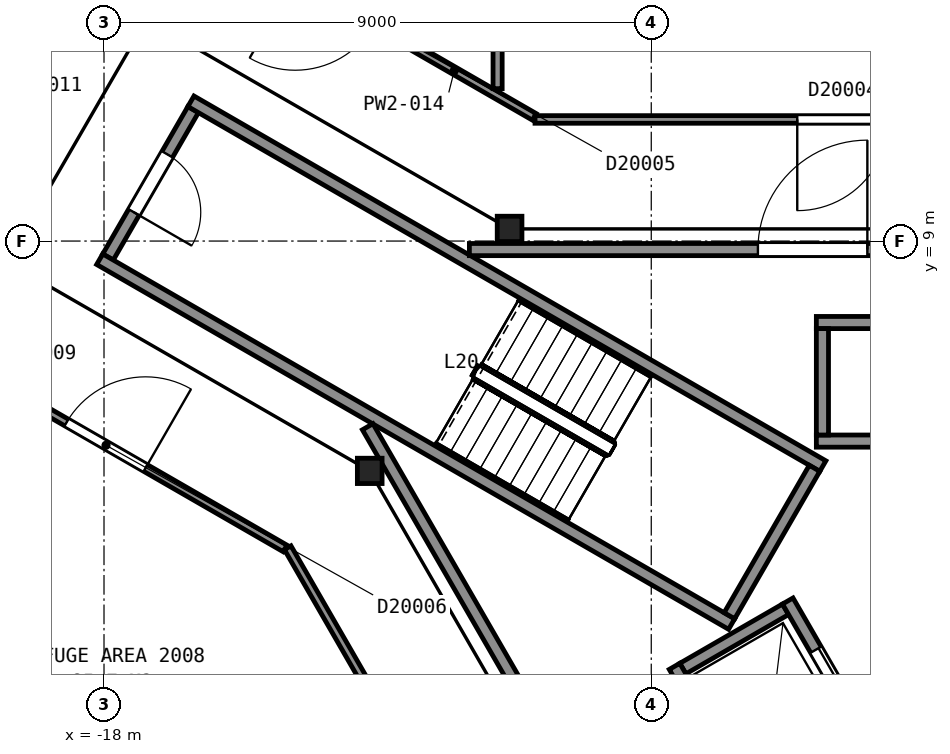
"""IFC4 building model, lengths in metres.
Left out: names, types, materials, properties, quantities, classifications, styles, units other than length and angle.
Written with IfcOpenShell. Run it as: python <this file> out.ifc"""

import sys

from ifc_helpers import new_model, si_unit, direction, frame, frame_2d, origin, origin_2d, place, context, subcontext, project, spatial, rectangle, i_section, extrude, element, fill, save


model = new_model("IFC4")
c1 = context("Model", 3, precision=1e-05, world=origin(), true_north=direction((0.0, 1.0)))
c2 = subcontext(c1, "Body", "Model", "MODEL_VIEW")
j1 = project(units=[si_unit("LENGTHUNIT", "METRE"), si_unit("PLANEANGLEUNIT", "RADIAN")], contexts=[c1])
p1 = place(None, origin())
s1 = spatial("IfcSite", under=j1, at=p1, CompositionType="ELEMENT")
p2 = place(p1, origin())
s2 = spatial("IfcBuilding", under=s1, at=p2, CompositionType="ELEMENT")
p3 = place(p2, frame((0.0, 0.0, 87.2)))
s3 = spatial("IfcBuildingStorey", under=s2, at=p3, CompositionType="ELEMENT", Elevation=87.2)
for number, where, z_axis, x_axis in (
    (1, (-11.33, 9.2, 0.0), (0.0, 0.0, 1.0), (1.0, 0.0, 0.0)),
    (2, (-13.63, 5.22, 0.0), (0.0, 0.0, 1.0), (1.0, 0.0, 0.0)),
):
    element("IfcColumn", number, at=place(p3, frame(where, z_axis=z_axis, x_axis=x_axis)), inside=s3, PredefinedType="COLUMN", context=c2, shape_type="SweptSolid", body=[
        extrude(i_section(OverallWidth=0.406, OverallDepth=0.417, WebThickness=0.03, FlangeThickness=0.048, FilletRadius=0.015, at=origin_2d()), origin(), (0.0, 0.0, 1.0), 5.6),
    ])
p4 = place(p3, frame((-16.534, 11.162, 0.0), z_axis=(0.0, 0.0, 1.0), x_axis=(-0.49998411664, -0.866034573852, 0.0)))
e3 = element("IfcWall", 3, at=p4, inside=s3, PredefinedType="PARTITIONING", context=c2, shape_type="SweptSolid", body=[
    extrude(rectangle(XDim=2.8, YDim=0.2, at=frame_2d((1.4, 0.0))), origin(), (0.0, 0.0, 1.0), 5.35),
])
p5 = place(p4, frame((0.85, 0.0, 0.0)))
e4 = element("IfcOpeningElement", 4, at=p5, cuts=e3, PredefinedType="OPENING", context=c2, shape_type="SweptSolid", body=[
    extrude(rectangle(XDim=1.1, YDim=2.1, at=frame_2d((0.55, 1.05))), frame((0.0, 0.11, 0.0), z_axis=(0.0, -1.0, 0.0), x_axis=(1.0, 0.0, 0.0)), (0.0, 0.0, 1.0), 0.22),
])
for number, where, z_axis, x_axis in (
    (5, (-7.678, 2.701, 0.0), (0.0, 0.0, 1.0), (-0.866, 0.5, 0.0)),
    (6, (-6.178, 5.299, 0.0), (0.0, 0.0, 1.0), (-0.866, 0.5, 0.0)),
):
    element("IfcWall", number, at=place(p3, frame(where, z_axis=z_axis, x_axis=x_axis)), inside=s3, PredefinedType="PARTITIONING", context=c2, shape_type="SweptSolid", body=[
        extrude(rectangle(XDim=12.0, YDim=0.2, at=frame_2d((6.0, 0.0))), origin(), (0.0, 0.0, 1.0), 5.35),
    ])
p6 = place(p3, frame((-6.315, 5.262, 0.0), z_axis=(0.0, 0.0, 1.0), x_axis=(-0.500049511043, -0.865996816683, 0.0)))
e7 = element("IfcWall", 7, at=p6, inside=s3, PredefinedType="PARTITIONING", context=c2, shape_type="SweptSolid", body=[
    extrude(rectangle(XDim=2.8, YDim=0.2, at=frame_2d((1.4, 0.0))), origin(), (0.0, 0.0, 1.0), 5.35),
])
for number, where, z_axis, x_axis in (
    (8, (-6.285, 5.71, 0.0), (0.0, 0.0, 1.0), (1.0, 0.0, 0.0)),
    (9, (-6.285, 7.66, 0.0), (0.0, 0.0, 1.0), (1.0, 0.0, 0.0)),
):
    element("IfcWall", number, at=place(p3, frame(where, z_axis=z_axis, x_axis=x_axis)), inside=s3, PredefinedType="PARTITIONING", context=c2, shape_type="SweptSolid", body=[
        extrude(rectangle(XDim=2.35, YDim=0.2, at=frame_2d((1.175, 0.0))), origin(), (0.0, 0.0, 1.0), 5.6),
    ])
p7 = place(p3, frame((-8.48, 1.969, 0.0), z_axis=(0.0, 0.0, 1.0), x_axis=(0.866000020948, 0.500043961785, 0.0)))
e10 = element("IfcWall", 10, at=p7, inside=s3, PredefinedType="PARTITIONING", context=c2, shape_type="SweptSolid", body=[
    extrude(rectangle(XDim=1.95, YDim=0.2, at=frame_2d((0.975, 0.0))), origin(), (0.0, 0.0, 1.0), 5.6),
])
p8 = place(p3, frame((-6.185, 5.81, 0.0), z_axis=(0.0, 0.0, 1.0), x_axis=(0.0, 1.0, 0.0)))
e11 = element("IfcWall", 11, at=p8, inside=s3, PredefinedType="PARTITIONING", context=c2, shape_type="SweptSolid", body=[
    extrude(rectangle(XDim=1.75, YDim=0.2, at=frame_2d((0.875, 0.0))), origin(), (0.0, 0.0, 1.0), 5.6),
])
p9 = place(p3, frame((-5.28, 0.525, 0.0), z_axis=(0.0, 0.0, 1.0), x_axis=(-0.500037662692, 0.866003658127, 0.0)))
e12 = element("IfcWall", 12, at=p9, inside=s3, PredefinedType="PARTITIONING", context=c2, shape_type="SweptSolid", body=[
    extrude(rectangle(XDim=2.95, YDim=0.2, at=frame_2d((1.475, 0.0))), origin(), (0.0, 0.0, 1.0), 5.6),
])
p10 = place(p9, frame((0.925, 0.0, 0.0)))
e13 = element("IfcOpeningElement", 13, at=p10, cuts=e12, PredefinedType="OPENING", context=c2, shape_type="SweptSolid", body=[
    extrude(rectangle(XDim=1.1, YDim=2.1, at=frame_2d((0.55, 1.05))), frame((0.0, 0.11, 0.0), z_axis=(0.0, -1.0, 0.0), x_axis=(1.0, 0.0, 0.0)), (0.0, 0.0, 1.0), 0.22),
])
p11 = place(p3, frame((-7.242, -0.376, 0.0), z_axis=(0.0, 0.0, 1.0), x_axis=(-0.499996545922, 0.866027397988, 0.0)))
e14 = element("IfcWall", 14, at=p11, inside=s3, PredefinedType="PARTITIONING", context=c2, shape_type="SweptSolid", body=[
    extrude(rectangle(XDim=2.75, YDim=0.2, at=frame_2d((1.375, 0.0))), origin(), (0.0, 0.0, 1.0), 5.6),
])
p12 = place(p3, frame((-13.664, 5.946, 0.0), z_axis=(0.0, 0.0, 1.0), x_axis=(0.499994327219, -0.866028678941, 0.0)))
e15 = element("IfcWall", 15, at=p12, inside=s3, PredefinedType="PARTITIONING", context=c2, shape_type="SweptSolid", body=[
    extrude(rectangle(XDim=23.968, YDim=0.2, at=frame_2d((11.984, 0.0))), origin(), (0.0, 0.0, 1.0), 5.35),
])
p13 = place(p3, frame((0.263, 8.86, 0.0), z_axis=(0.0, 0.0, 1.0), x_axis=(-1.0, 0.0, 0.0)))
e16 = element("IfcWall", 16, at=p13, inside=s3, PredefinedType="PARTITIONING", context=c2, shape_type="SweptSolid", body=[
    extrude(rectangle(XDim=12.254, YDim=0.2, at=frame_2d((6.127, 0.0))), origin(), (0.0, 0.0, 1.0), 5.35),
])
p14 = place(p13, frame((5.709, 0.0, 0.0)))
e17 = element("IfcOpeningElement", 17, at=p14, cuts=e16, PredefinedType="OPENING", context=c2, shape_type="SweptSolid", body=[
    extrude(rectangle(XDim=1.8, YDim=2.1, at=frame_2d((0.9, 1.05))), frame((0.0, 0.11, 0.0), z_axis=(0.0, -1.0, 0.0), x_axis=(1.0, 0.0, 0.0)), (0.0, 0.0, 1.0), 0.22),
])
p15 = place(p3, frame((-15.022, 3.944, 0.0), z_axis=(0.0, 0.0, 1.0), x_axis=(-0.866435403895, 0.49928918562, 0.0)))
e18 = element("IfcWall", 18, at=p15, inside=s3, PredefinedType="PARTITIONING", context=c2, shape_type="SweptSolid", body=[
    extrude(rectangle(XDim=6.912, YDim=0.125, at=frame_2d((3.456, 0.0))), origin(), (0.0, 0.0, 1.0), 4.262),
])
p16 = place(p15, frame((2.649, 0.0, 0.0)))
e19 = element("IfcOpeningElement", 19, at=p16, cuts=e18, PredefinedType="OPENING", context=c2, shape_type="SweptSolid", body=[
    extrude(rectangle(XDim=1.5, YDim=2.1, at=frame_2d((0.75, 1.05))), frame((0.0, 0.073, 0.0), z_axis=(0.0, -1.0, 0.0), x_axis=(1.0, 0.0, 0.0)), (0.0, 0.0, 1.0), 0.145),
])
p17 = place(p3, frame((-16.903, 14.489, 0.0), z_axis=(0.0, 0.0, 1.0), x_axis=(0.866404548649, -0.499342726071, 0.0)))
e20 = element("IfcWall", 20, at=p17, inside=s3, PredefinedType="PARTITIONING", context=c2, shape_type="SweptSolid", body=[
    extrude(rectangle(XDim=6.903, YDim=0.125, at=frame_2d((3.451, 0.0))), origin(), (0.0, 0.0, 1.0), 4.262),
])
p18 = place(p17, frame((2.363, 0.0, 0.0)))
e21 = element("IfcOpeningElement", 21, at=p18, cuts=e20, PredefinedType="OPENING", context=c2, shape_type="SweptSolid", body=[
    extrude(rectangle(XDim=1.5, YDim=2.1, at=frame_2d((0.75, 1.05))), frame((0.0, 0.073, 0.0), z_axis=(0.0, -1.0, 0.0), x_axis=(1.0, 0.0, 0.0)), (0.0, 0.0, 1.0), 0.145),
])
p19 = place(p3, frame((-14.979, 3.956, 0.0), z_axis=(0.0, 0.0, 1.0), x_axis=(0.499335058772, -0.866408967568, 0.0)))
e22 = element("IfcWall", 22, at=p19, inside=s3, PredefinedType="PARTITIONING", context=c2, shape_type="SweptSolid", body=[
    extrude(rectangle(XDim=10.913, YDim=0.125, at=frame_2d((5.457, 0.0))), origin(), (0.0, 0.0, 1.0), 4.262),
])
p20 = place(p3, frame((-11.527, 11.506, 0.0), z_axis=(0.0, 0.0, 1.0), x_axis=(0.0, 1.0, 0.0)))
e23 = element("IfcWall", 23, at=p20, inside=s3, PredefinedType="PARTITIONING", context=c2, shape_type="SweptSolid", body=[
    extrude(rectangle(XDim=6.149, YDim=0.15, at=frame_2d((3.074, 0.0))), origin(), (0.0, 0.0, 1.0), 4.262),
])
p21 = place(p3, frame((-10.912, 11.0, 0.0), z_axis=(0.0, 0.0, 1.0), x_axis=(1.0, 0.0, 0.0)))
e24 = element("IfcWall", 24, at=p21, inside=s3, PredefinedType="PARTITIONING", context=c2, shape_type="SweptSolid", body=[
    extrude(rectangle(XDim=21.823, YDim=0.125, at=frame_2d((10.912, 0.0))), origin(), (0.0, 0.0, 1.0), 4.262),
])
p22 = place(p21, frame((17.946, 0.0, 0.0)))
e25 = element("IfcOpeningElement", 25, at=p22, cuts=e24, PredefinedType="OPENING", context=c2, shape_type="SweptSolid", body=[
    extrude(rectangle(XDim=1.2, YDim=2.1, at=frame_2d((0.6, 1.05))), frame((0.0, 0.073, 0.0), z_axis=(0.0, -1.0, 0.0), x_axis=(1.0, 0.0, 0.0)), (0.0, 0.0, 1.0), 0.145),
])
p23 = place(p21, frame((12.074, 0.0, 0.0)))
e26 = element("IfcOpeningElement", 26, at=p23, cuts=e24, PredefinedType="OPENING", context=c2, shape_type="SweptSolid", body=[
    extrude(rectangle(XDim=1.2, YDim=2.1, at=frame_2d((0.6, 1.05))), frame((0.0, 0.073, 0.0), z_axis=(0.0, -1.0, 0.0), x_axis=(1.0, 0.0, 0.0)), (0.0, 0.0, 1.0), 0.145),
])
p24 = place(p21, frame((4.312, 0.0, 0.0)))
e27 = element("IfcOpeningElement", 27, at=p24, cuts=e24, PredefinedType="OPENING", context=c2, shape_type="SweptSolid", body=[
    extrude(rectangle(XDim=1.5, YDim=2.1, at=frame_2d((0.75, 1.05))), frame((0.0, 0.073, 0.0), z_axis=(0.0, -1.0, 0.0), x_axis=(1.0, 0.0, 0.0)), (0.0, 0.0, 1.0), 0.145),
])
p25 = place(p5, origin())
e28 = element("IfcDoor", 28, at=p25, inside=s3, OperationType="SINGLE_SWING_RIGHT", PredefinedType="DOOR", context=c2, shape_type="SweptSolid", body=[
    extrude(rectangle(XDim=1.1, YDim=2.1, at=frame_2d((0.55, 1.05))), frame((0.0, 0.025, 0.0), z_axis=(0.0, -1.0, 0.0), x_axis=(1.0, 0.0, 0.0)), (0.0, 0.0, 1.0), 0.05),
])
fill(e4, e28)
p26 = place(p10, origin())
e29 = element("IfcDoor", 29, at=p26, inside=s3, OperationType="SLIDING_TO_LEFT", PredefinedType="DOOR", context=c2, shape_type="SweptSolid", body=[
    extrude(rectangle(XDim=1.1, YDim=2.1, at=frame_2d((0.55, 1.05))), frame((0.0, 0.025, 0.0), z_axis=(0.0, -1.0, 0.0), x_axis=(1.0, 0.0, 0.0)), (0.0, 0.0, 1.0), 0.05),
])
fill(e13, e29)
p27 = place(p14, origin())
e30 = element("IfcDoor", 30, at=p27, inside=s3, OperationType="DOUBLE_DOOR_SINGLE_SWING", PredefinedType="DOOR", context=c2, shape_type="SweptSolid", body=[
    extrude(rectangle(XDim=1.8, YDim=2.1, at=frame_2d((0.9, 1.05))), frame((0.0, 0.025, 0.0), z_axis=(0.0, -1.0, 0.0), x_axis=(1.0, 0.0, 0.0)), (0.0, 0.0, 1.0), 0.05),
])
fill(e17, e30)
p28 = place(p16, origin())
e31 = element("IfcDoor", 31, at=p28, inside=s3, OperationType="DOUBLE_DOOR_SINGLE_SWING", PredefinedType="DOOR", context=c2, shape_type="SweptSolid", body=[
    extrude(rectangle(XDim=1.5, YDim=2.1, at=frame_2d((0.75, 1.05))), frame((0.0, 0.025, 0.0), z_axis=(0.0, -1.0, 0.0), x_axis=(1.0, 0.0, 0.0)), (0.0, 0.0, 1.0), 0.05),
])
fill(e19, e31)
p29 = place(p24, origin())
e32 = element("IfcDoor", 32, at=p29, inside=s3, OperationType="DOUBLE_DOOR_SINGLE_SWING", PredefinedType="DOOR", context=c2, shape_type="SweptSolid", body=[
    extrude(rectangle(XDim=1.5, YDim=2.1, at=frame_2d((0.75, 1.05))), frame((0.0, 0.025, 0.0), z_axis=(0.0, -1.0, 0.0), x_axis=(1.0, 0.0, 0.0)), (0.0, 0.0, 1.0), 0.05),
])
fill(e27, e32)
save(model, sys.argv[1])
